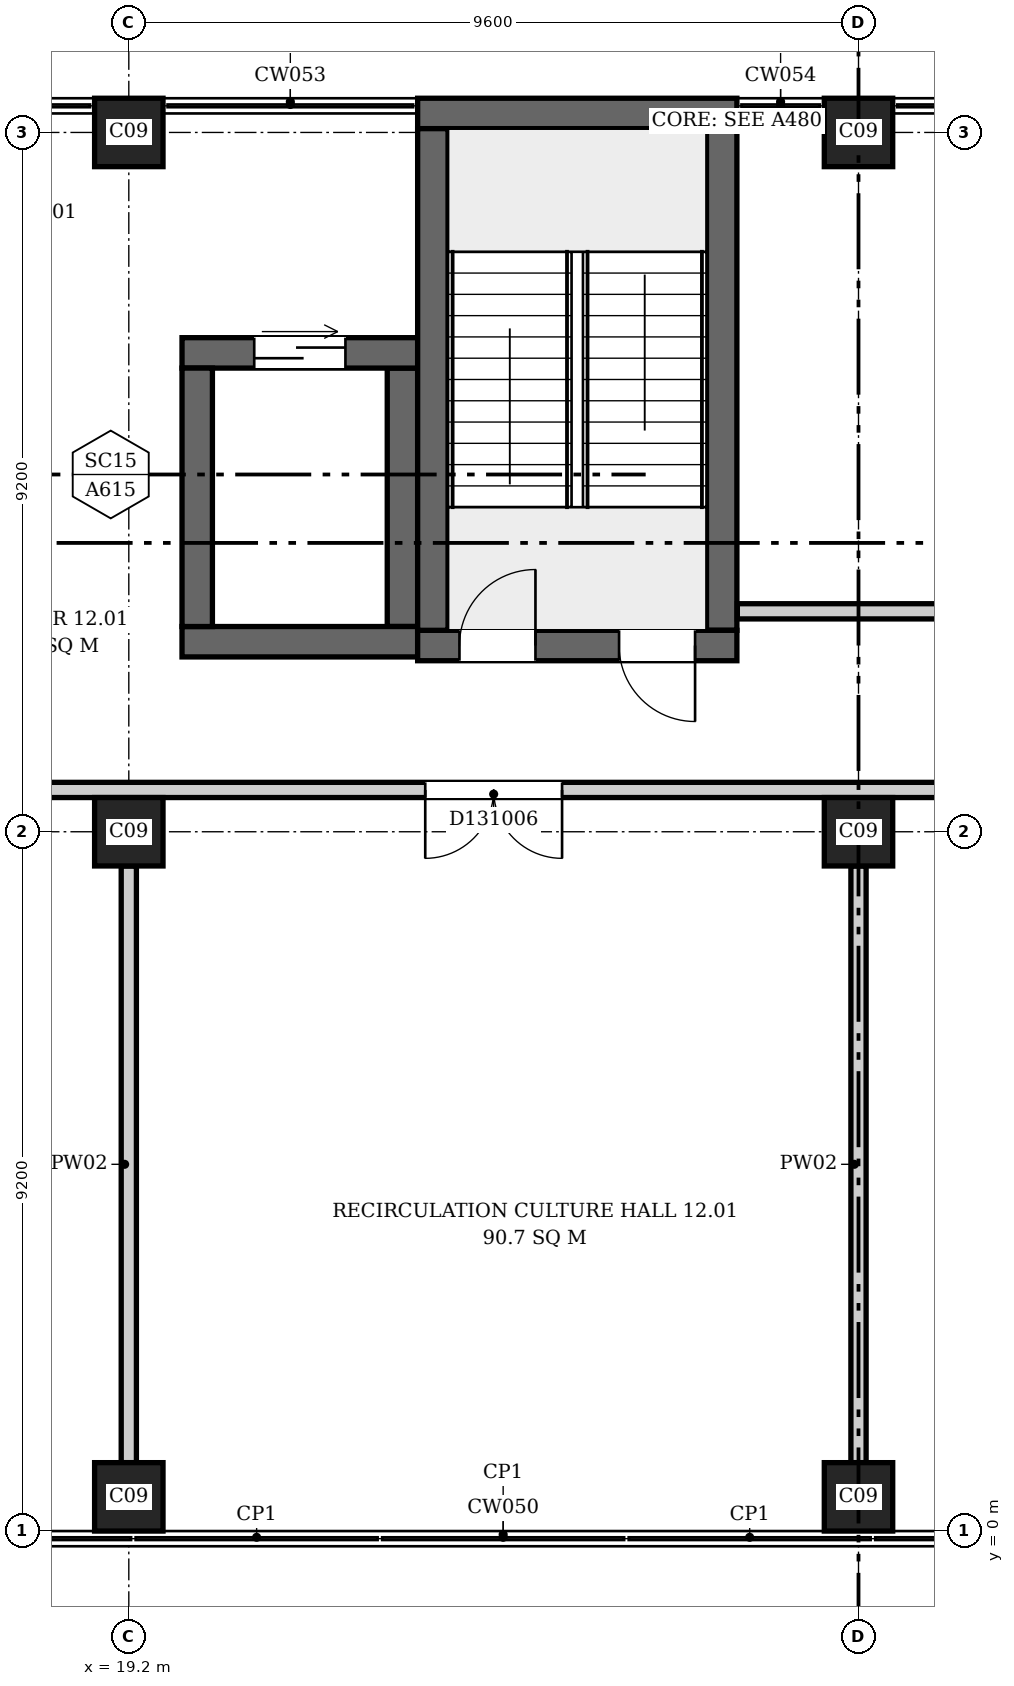
"""IFC4 building model, lengths in metres.
Left out: names, types, materials, properties, quantities, classifications, styles, units other than length and angle.
Written with IfcOpenShell. Run it as: python <this file> out.ifc"""

import sys

from ifc_helpers import new_model, si_unit, direction, frame, frame_2d, origin, origin_2d, place, context, subcontext, project, spatial, rectangle, extrude, element, fill, save


model = new_model("IFC4")
c1 = context("Model", 3, precision=1e-05, world=origin(), true_north=direction((0.0, 1.0)))
c2 = subcontext(c1, "Body", "Model", "MODEL_VIEW")
j1 = project(units=[si_unit("LENGTHUNIT", "METRE"), si_unit("PLANEANGLEUNIT", "RADIAN")], contexts=[c1])
p1 = place(None, origin())
s1 = spatial("IfcSite", under=j1, at=p1, CompositionType="ELEMENT")
p2 = place(p1, origin())
s2 = spatial("IfcBuilding", under=s1, at=p2, CompositionType="ELEMENT")
p3 = place(p2, frame((0.0, 0.0, 61.3)))
s3 = spatial("IfcBuildingStorey", under=s2, at=p3, CompositionType="ELEMENT", Elevation=61.3)
p4 = place(p3, frame((23.0, 11.65, 0.0), z_axis=(0.0, 0.0, 1.0), x_axis=(1.0, 0.0, 0.0)))
e1 = element("IfcWall", 1, at=p4, inside=s3, PredefinedType="SHEAR", context=c2, shape_type="SweptSolid", body=[
    extrude(rectangle(XDim=4.2, YDim=0.4, at=frame_2d((2.1, 0.0))), origin(), (0.0, 0.0, 1.0), 4.2),
])
p5 = place(p4, frame((0.55, 0.0, 0.0)))
e2 = element("IfcOpeningElement", 2, at=p5, cuts=e1, PredefinedType="OPENING", context=c2, shape_type="SweptSolid", body=[
    extrude(rectangle(XDim=1.0, YDim=2.1, at=frame_2d((0.5, 1.05))), frame((0.0, 0.21, 0.0), z_axis=(0.0, -1.0, 0.0), x_axis=(1.0, 0.0, 0.0)), (0.0, 0.0, 1.0), 0.42),
])
p6 = place(p4, frame((2.65, 0.0, 0.0)))
e3 = element("IfcOpeningElement", 3, at=p6, cuts=e1, PredefinedType="OPENING", context=c2, shape_type="SweptSolid", body=[
    extrude(rectangle(XDim=1.0, YDim=2.1, at=frame_2d((0.5, 1.05))), frame((0.0, 0.21, 0.0), z_axis=(0.0, -1.0, 0.0), x_axis=(1.0, 0.0, 0.0)), (0.0, 0.0, 1.0), 0.42),
])
p7 = place(p3, frame((23.0, 18.65, 0.0), z_axis=(0.0, 0.0, 1.0), x_axis=(1.0, 0.0, 0.0)))
e4 = element("IfcWall", 4, at=p7, inside=s3, PredefinedType="SHEAR", context=c2, shape_type="SweptSolid", body=[
    extrude(rectangle(XDim=4.2, YDim=0.4, at=frame_2d((2.1, 0.0))), origin(), (0.0, 0.0, 1.0), 4.2),
])
for number, where, z_axis, x_axis in (
    (5, (23.2, 11.85, 0.0), (0.0, 0.0, 1.0), (0.0, 1.0, 0.0)),
    (6, (27.0, 11.85, 0.0), (0.0, 0.0, 1.0), (0.0, 1.0, 0.0)),
):
    element("IfcWall", number, at=place(p3, frame(where, z_axis=z_axis, x_axis=x_axis)), inside=s3, PredefinedType="SHEAR", context=c2, shape_type="SweptSolid", body=[
        extrude(rectangle(XDim=6.6, YDim=0.4, at=frame_2d((3.3, 0.0))), origin(), (0.0, 0.0, 1.0), 4.2),
    ])
p8 = place(p3, frame((19.9, 11.7, 0.0), z_axis=(0.0, 0.0, 1.0), x_axis=(1.0, 0.0, 0.0)))
e7 = element("IfcWall", 7, at=p8, inside=s3, PredefinedType="SHEAR", context=c2, shape_type="SweptSolid", body=[
    extrude(rectangle(XDim=3.1, YDim=0.4, at=frame_2d((1.55, 0.0))), origin(), (0.0, 0.0, 1.0), 4.2),
])
p9 = place(p3, frame((19.9, 15.5, 0.0), z_axis=(0.0, 0.0, 1.0), x_axis=(1.0, 0.0, 0.0)))
e8 = element("IfcWall", 8, at=p9, inside=s3, PredefinedType="SHEAR", context=c2, shape_type="SweptSolid", body=[
    extrude(rectangle(XDim=3.1, YDim=0.4, at=frame_2d((1.55, 0.0))), origin(), (0.0, 0.0, 1.0), 4.2),
])
p10 = place(p9, frame((0.95, 0.0, 0.0)))
e9 = element("IfcOpeningElement", 9, at=p10, cuts=e8, PredefinedType="OPENING", context=c2, shape_type="SweptSolid", body=[
    extrude(rectangle(XDim=1.2, YDim=2.1, at=frame_2d((0.6, 1.05))), frame((0.0, 0.21, 0.0), z_axis=(0.0, -1.0, 0.0), x_axis=(1.0, 0.0, 0.0)), (0.0, 0.0, 1.0), 0.42),
])
for number, where, z_axis, x_axis in (
    (10, (20.1, 11.9, 0.0), (0.0, 0.0, 1.0), (0.0, 1.0, 0.0)),
    (11, (22.8, 11.9, 0.0), (0.0, 0.0, 1.0), (0.0, 1.0, 0.0)),
):
    element("IfcWall", number, at=place(p3, frame(where, z_axis=z_axis, x_axis=x_axis)), inside=s3, PredefinedType="SHEAR", context=c2, shape_type="SweptSolid", body=[
        extrude(rectangle(XDim=3.4, YDim=0.4, at=frame_2d((1.7, 0.0))), origin(), (0.0, 0.0, 1.0), 4.2),
    ])
for number, where, z_axis, x_axis in (
    (12, (19.2, 0.45, 0.0), (0.0, 0.0, 1.0), (1.0, 0.0, 0.0)),
    (13, (28.8, 0.45, 0.0), (0.0, 0.0, 1.0), (1.0, 0.0, 0.0)),
    (14, (19.2, 9.2, 0.0), (0.0, 0.0, 1.0), (1.0, 0.0, 0.0)),
    (15, (28.8, 9.2, 0.0), (0.0, 0.0, 1.0), (1.0, 0.0, 0.0)),
    (16, (19.2, 18.4, 0.0), (0.0, 0.0, 1.0), (1.0, 0.0, 0.0)),
    (17, (28.8, 18.4, 0.0), (0.0, 0.0, 1.0), (1.0, 0.0, 0.0)),
):
    element("IfcColumn", number, at=place(p3, frame(where, z_axis=z_axis, x_axis=x_axis)), inside=s3, PredefinedType="COLUMN", context=c2, shape_type="SweptSolid", body=[
        extrude(rectangle(XDim=0.9, YDim=0.9, at=origin_2d()), origin(), (0.0, 0.0, 1.0), 4.2),
    ])
p11 = place(p3, frame((4.3, 9.75, 0.0), z_axis=(0.0, 0.0, 1.0), x_axis=(1.0, 0.0, 0.0)))
e18 = element("IfcWall", 18, at=p11, inside=s3, PredefinedType="PARTITIONING", context=c2, shape_type="SweptSolid", body=[
    extrude(rectangle(XDim=43.894, YDim=0.2, at=frame_2d((21.947, 0.0))), origin(), (0.0, 0.0, 1.0), 3.9),
])
p12 = place(p11, frame((18.8, 0.0, 0.0)))
e19 = element("IfcOpeningElement", 19, at=p12, cuts=e18, PredefinedType="OPENING", context=c2, shape_type="SweptSolid", body=[
    extrude(rectangle(XDim=1.8, YDim=2.1, at=frame_2d((0.9, 1.05))), frame((0.0, 0.11, 0.0), z_axis=(0.0, -1.0, 0.0), x_axis=(1.0, 0.0, 0.0)), (0.0, 0.0, 1.0), 0.22),
])
p13 = place(p11, frame((28.7, 0.0, 0.0)))
e20 = element("IfcOpeningElement", 20, at=p13, cuts=e18, PredefinedType="OPENING", context=c2, shape_type="SweptSolid", body=[
    extrude(rectangle(XDim=1.2, YDim=2.1, at=frame_2d((0.6, 1.05))), frame((0.0, 0.11, 0.0), z_axis=(0.0, -1.0, 0.0), x_axis=(1.0, 0.0, 0.0)), (0.0, 0.0, 1.0), 0.22),
])
p14 = place(p11, frame((36.05, 0.0, 0.0)))
e21 = element("IfcOpeningElement", 21, at=p14, cuts=e18, PredefinedType="OPENING", context=c2, shape_type="SweptSolid", body=[
    extrude(rectangle(XDim=0.9, YDim=2.1, at=frame_2d((0.45, 1.05))), frame((0.0, 0.11, 0.0), z_axis=(0.0, -1.0, 0.0), x_axis=(1.0, 0.0, 0.0)), (0.0, 0.0, 1.0), 0.22),
])
p15 = place(p11, frame((40.8, 0.0, 0.0)))
e22 = element("IfcOpeningElement", 22, at=p15, cuts=e18, PredefinedType="OPENING", context=c2, shape_type="SweptSolid", body=[
    extrude(rectangle(XDim=1.2, YDim=2.1, at=frame_2d((0.6, 1.05))), frame((0.0, 0.11, 0.0), z_axis=(0.0, -1.0, 0.0), x_axis=(1.0, 0.0, 0.0)), (0.0, 0.0, 1.0), 0.22),
])
p16 = place(p3, frame((19.2, 0.9, 0.0), z_axis=(0.0, 0.0, 1.0), x_axis=(0.0, 1.0, 0.0)))
e23 = element("IfcWall", 23, at=p16, inside=s3, PredefinedType="PARTITIONING", context=c2, shape_type="SweptSolid", body=[
    extrude(rectangle(XDim=7.85, YDim=0.2, at=frame_2d((3.925, 0.0))), origin(), (0.0, 0.0, 1.0), 3.9),
])
p17 = place(p3, frame((27.206, 12.1, 0.0), z_axis=(0.0, 0.0, 1.0), x_axis=(1.0, 0.0, 0.0)))
e24 = element("IfcWall", 24, at=p17, inside=s3, PredefinedType="PARTITIONING", context=c2, shape_type="SweptSolid", body=[
    extrude(rectangle(XDim=20.988, YDim=0.2, at=frame_2d((10.494, 0.0))), origin(), (0.0, 0.0, 1.0), 3.9),
])
p18 = place(p17, frame((4.844, 0.0, 0.0)))
e25 = element("IfcOpeningElement", 25, at=p18, cuts=e24, PredefinedType="OPENING", context=c2, shape_type="SweptSolid", body=[
    extrude(rectangle(XDim=1.5, YDim=2.1, at=frame_2d((0.75, 1.05))), frame((0.0, 0.11, 0.0), z_axis=(0.0, -1.0, 0.0), x_axis=(1.0, 0.0, 0.0)), (0.0, 0.0, 1.0), 0.22),
])
p19 = place(p17, frame((15.494, 0.0, 0.0)))
e26 = element("IfcOpeningElement", 26, at=p19, cuts=e24, PredefinedType="OPENING", context=c2, shape_type="SweptSolid", body=[
    extrude(rectangle(XDim=1.2, YDim=2.1, at=frame_2d((0.6, 1.05))), frame((0.0, 0.11, 0.0), z_axis=(0.0, -1.0, 0.0), x_axis=(1.0, 0.0, 0.0)), (0.0, 0.0, 1.0), 0.22),
])
p20 = place(p3, frame((28.8, 0.9, 0.0), z_axis=(0.0, 0.0, 1.0), x_axis=(0.0, 1.0, 0.0)))
e27 = element("IfcWall", 27, at=p20, inside=s3, PredefinedType="PARTITIONING", context=c2, shape_type="SweptSolid", body=[
    extrude(rectangle(XDim=7.85, YDim=0.2, at=frame_2d((3.925, 0.0))), origin(), (0.0, 0.0, 1.0), 3.9),
])
p21 = place(p5, origin())
e28 = element("IfcDoor", 28, at=p21, inside=s3, OperationType="SINGLE_SWING_RIGHT", PredefinedType="DOOR", context=c2, shape_type="SweptSolid", body=[
    extrude(rectangle(XDim=1.0, YDim=2.1, at=frame_2d((0.5, 1.05))), frame((0.0, 0.025, 0.0), z_axis=(0.0, -1.0, 0.0), x_axis=(1.0, 0.0, 0.0)), (0.0, 0.0, 1.0), 0.05),
])
fill(e2, e28)
p22 = place(p6, origin())
e29 = element("IfcDoor", 29, at=p22, inside=s3, OperationType="SINGLE_SWING_LEFT", PredefinedType="DOOR", context=c2, shape_type="SweptSolid", body=[
    extrude(rectangle(XDim=1.0, YDim=2.1, at=frame_2d((0.5, 1.05))), frame((0.0, 0.025, 0.0), z_axis=(0.0, -1.0, 0.0), x_axis=(1.0, 0.0, 0.0)), (0.0, 0.0, 1.0), 0.05),
])
fill(e3, e29)
p23 = place(p10, origin())
e30 = element("IfcDoor", 30, at=p23, inside=s3, OperationType="DOUBLE_DOOR_SLIDING", PredefinedType="DOOR", context=c2, shape_type="SweptSolid", body=[
    extrude(rectangle(XDim=1.2, YDim=2.1, at=frame_2d((0.6, 1.05))), frame((0.0, 0.025, 0.0), z_axis=(0.0, -1.0, 0.0), x_axis=(1.0, 0.0, 0.0)), (0.0, 0.0, 1.0), 0.05),
])
fill(e9, e30)
p24 = place(p12, origin())
e31 = element("IfcDoor", 31, at=p24, inside=s3, OperationType="DOUBLE_DOOR_SINGLE_SWING", PredefinedType="DOOR", context=c2, shape_type="SweptSolid", body=[
    extrude(rectangle(XDim=1.8, YDim=2.1, at=frame_2d((0.9, 1.05))), frame((0.0, 0.025, 0.0), z_axis=(0.0, -1.0, 0.0), x_axis=(1.0, 0.0, 0.0)), (0.0, 0.0, 1.0), 0.05),
])
fill(e19, e31)
save(model, sys.argv[1])
